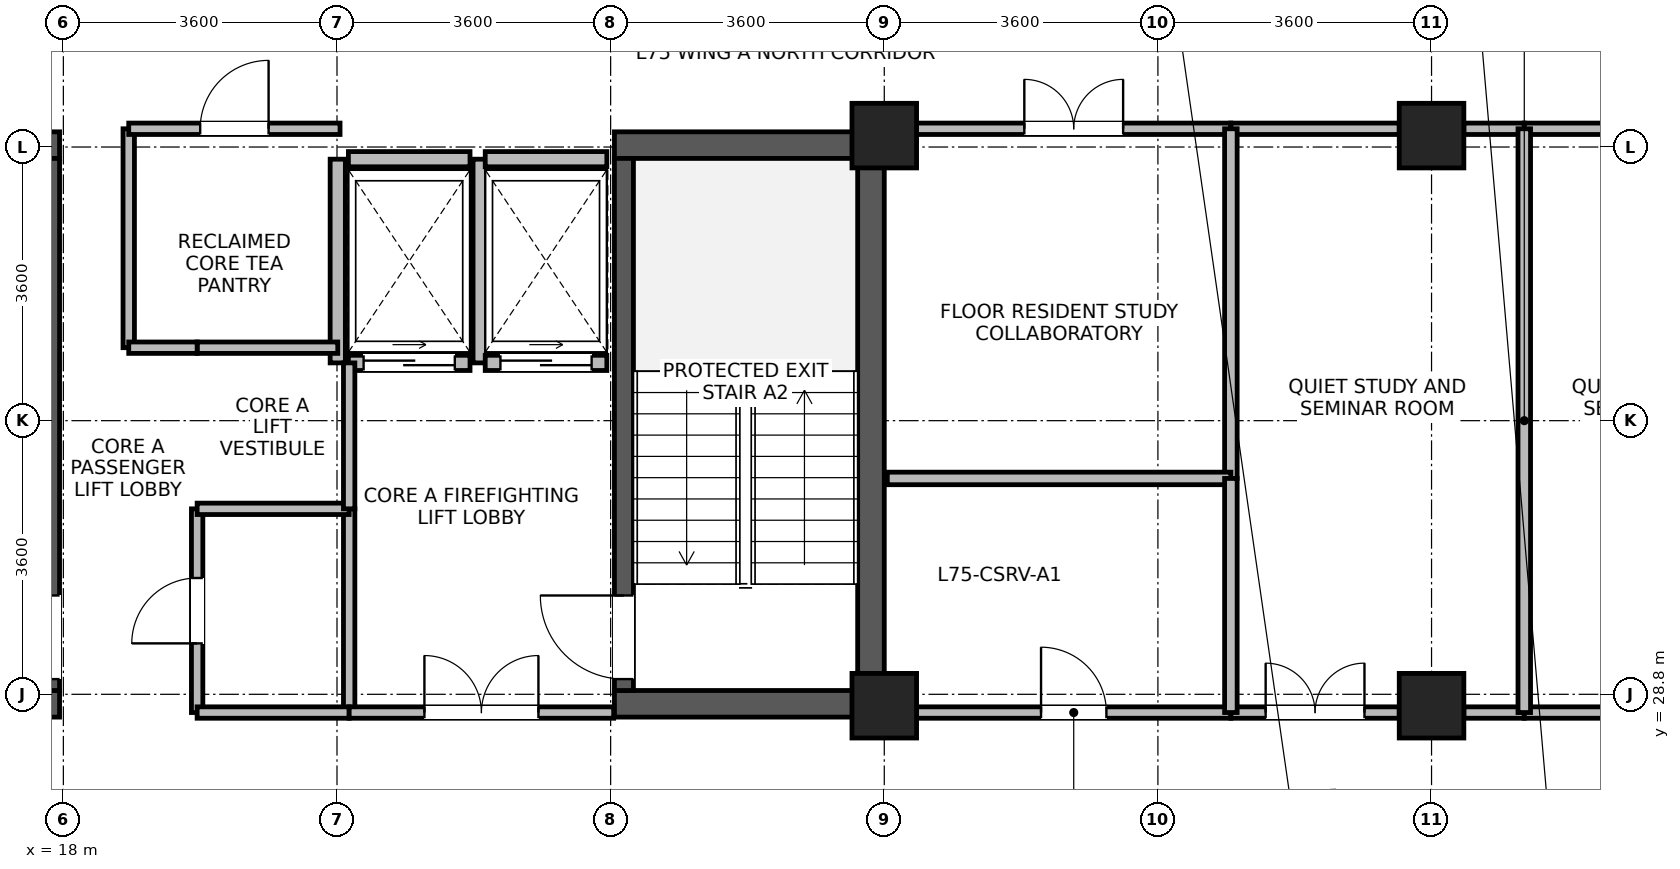
"""IFC4 building model, lengths in metres.
Left out: names, types, materials, properties, quantities, classifications, styles, units other than length and angle.
Written with IfcOpenShell. Run it as: python <this file> out.ifc"""

import sys

from ifc_helpers import new_model, si_unit, direction, frame, frame_2d, origin, origin_2d, place, context, subcontext, project, spatial, rectangle, extrude, source, transform, mapped, element, fill, save


model = new_model("IFC4")
c1 = context("Model", 3, precision=1e-05, world=origin(), true_north=direction((0.0, 1.0)))
c2 = subcontext(c1, "Body", "Model", "MODEL_VIEW")
j1 = project(units=[si_unit("LENGTHUNIT", "METRE"), si_unit("PLANEANGLEUNIT", "RADIAN")], contexts=[c1])
p1 = place(None, origin())
s1 = spatial("IfcSite", under=j1, at=p1, CompositionType="ELEMENT")
p2 = place(p1, origin())
s2 = spatial("IfcBuilding", under=s1, at=p2, CompositionType="ELEMENT")
p3 = place(p2, frame((0.0, 0.0, 290.6)))
s3 = spatial("IfcBuildingStorey", under=s2, at=p3, CompositionType="ELEMENT", Elevation=290.6)
p4 = place(p3, frame((28.625, 28.5, 0.0), z_axis=(0.0, 0.0, 1.0), x_axis=(0.0, 1.0, 0.0)))
e1 = element("IfcWall", 1, at=p4, inside=s3, PredefinedType="SHEAR", context=c2, shape_type="SweptSolid", body=[
    extrude(rectangle(XDim=7.7, YDim=0.35, at=frame_2d((3.85, 0.0))), origin(), (0.0, 0.0, 1.0), 3.475),
])
for number, where, z_axis, x_axis in (
    (2, (14.75, 28.675, 0.0), (0.0, 0.0, 1.0), (1.0, 0.0, 0.0)),
    (3, (25.25, 28.675, 0.0), (0.0, 0.0, 1.0), (1.0, 0.0, 0.0)),
    (4, (14.75, 36.025, 0.0), (0.0, 0.0, 1.0), (1.0, 0.0, 0.0)),
    (5, (25.25, 36.025, 0.0), (0.0, 0.0, 1.0), (1.0, 0.0, 0.0)),
):
    element("IfcWall", number, at=place(p3, frame(where, z_axis=z_axis, x_axis=x_axis)), inside=s3, PredefinedType="SHEAR", context=c2, shape_type="SweptSolid", body=[
        extrude(rectangle(XDim=3.2, YDim=0.35, at=frame_2d((1.6, 0.0))), origin(), (0.0, 0.0, 1.0), 3.475),
    ])
p5 = place(p3, frame((17.825, 28.85, 0.0), z_axis=(0.0, 0.0, 1.0), x_axis=(0.0, 1.0, 0.0)))
e6 = element("IfcWall", 6, at=p5, inside=s3, PredefinedType="SHEAR", context=c2, shape_type="SweptSolid", body=[
    extrude(rectangle(XDim=7.0, YDim=0.25, at=frame_2d((3.5, 0.0))), origin(), (0.0, 0.0, 1.0), 3.475),
])
p6 = place(p5, frame((0.15, 0.0, 0.0)))
e7 = element("IfcOpeningElement", 7, at=p6, cuts=e6, PredefinedType="OPENING", context=c2, shape_type="SweptSolid", body=[
    extrude(rectangle(XDim=1.1, YDim=2.08, at=frame_2d((0.55, 1.04))), frame((0.0, 0.135, 0.0), z_axis=(0.0, -1.0, 0.0), x_axis=(1.0, 0.0, 0.0)), (0.0, 0.0, 1.0), 0.27),
])
p7 = place(p3, frame((25.375, 28.85, 0.0), z_axis=(0.0, 0.0, 1.0), x_axis=(0.0, 1.0, 0.0)))
e8 = element("IfcWall", 8, at=p7, inside=s3, PredefinedType="SHEAR", context=c2, shape_type="SweptSolid", body=[
    extrude(rectangle(XDim=7.0, YDim=0.25, at=frame_2d((3.5, 0.0))), origin(), (0.0, 0.0, 1.0), 3.475),
])
p8 = place(p7, frame((0.15, 0.0, 0.0)))
e9 = element("IfcOpeningElement", 9, at=p8, cuts=e8, PredefinedType="OPENING", context=c2, shape_type="SweptSolid", body=[
    extrude(rectangle(XDim=1.1, YDim=2.08, at=frame_2d((0.55, 1.04))), frame((0.0, 0.135, 0.0), z_axis=(0.0, -1.0, 0.0), x_axis=(1.0, 0.0, 0.0)), (0.0, 0.0, 1.0), 0.27),
])
m1 = source(origin(), c2, "Body", "SweptSolid", [
    extrude(rectangle(XDim=0.85, YDim=0.85, at=origin_2d()), origin(), (0.0, 0.0, 1.0), 3.7),
])
for number, where, z_axis, x_axis in (
    (10, (28.8, 28.65, 0.0), (0.0, 0.0, 1.0), (1.0, 0.0, 0.0)),
    (11, (28.8, 36.15, 0.0), (0.0, 0.0, 1.0), (1.0, 0.0, 0.0)),
    (12, (36.0, 28.65, 0.0), (0.0, 0.0, 1.0), (1.0, 0.0, 0.0)),
    (13, (36.0, 36.15, 0.0), (0.0, 0.0, 1.0), (1.0, 0.0, 0.0)),
):
    element("IfcColumn", number, at=place(p3, frame(where, z_axis=z_axis, x_axis=x_axis)), inside=s3, PredefinedType="COLUMN", context=c2, shape_type="MappedRepresentation", body=[
        mapped(m1, transform((0.0, 0.0, 0.0), x_axis=(1.0, 0.0, 0.0), y_axis=(0.0, 1.0, 0.0), z_axis=(0.0, 0.0, 1.0), scale=1.0)),
    ])
p9 = place(p3, frame((21.75, 33.16, 0.0), z_axis=(0.0, 0.0, 1.0), x_axis=(1.0, 0.0, 0.0)))
e14 = element("IfcWall", 14, at=p9, inside=s3, PredefinedType="PARTITIONING", context=c2, shape_type="SweptSolid", body=[
    extrude(rectangle(XDim=1.6, YDim=0.2, at=frame_2d((0.8, 0.0))), origin(), (0.0, 0.0, 1.0), 3.455),
])
p10 = place(p9, frame((0.2, 0.0, 0.0)))
e15 = element("IfcOpeningElement", 15, at=p10, cuts=e14, PredefinedType="OPENING", context=c2, shape_type="SweptSolid", body=[
    extrude(rectangle(XDim=1.2, YDim=2.12, at=frame_2d((0.6, 1.06))), frame((0.0, 0.11, 0.0), z_axis=(0.0, -1.0, 0.0), x_axis=(1.0, 0.0, 0.0)), (0.0, 0.0, 1.0), 0.22),
])
p11 = place(p3, frame((21.75, 35.84, 0.0), z_axis=(0.0, 0.0, 1.0), x_axis=(1.0, 0.0, 0.0)))
e16 = element("IfcWall", 16, at=p11, inside=s3, PredefinedType="PARTITIONING", context=c2, shape_type="SweptSolid", body=[
    extrude(rectangle(XDim=1.6, YDim=0.2, at=frame_2d((0.8, 0.0))), origin(), (0.0, 0.0, 1.0), 2.555),
])
for number, where, z_axis, x_axis in (
    (17, (21.61, 33.16, 0.0), (0.0, 0.0, 1.0), (0.0, 1.0, 0.0)),
    (18, (23.49, 33.16, 0.0), (0.0, 0.0, 1.0), (0.0, 1.0, 0.0)),
):
    element("IfcWall", number, at=place(p3, frame(where, z_axis=z_axis, x_axis=x_axis)), inside=s3, PredefinedType="PARTITIONING", context=c2, shape_type="SweptSolid", body=[
        extrude(rectangle(XDim=2.68, YDim=0.2, at=frame_2d((1.34, 0.0))), origin(), (0.0, 0.0, 1.0), 3.455),
    ])
p12 = place(p3, frame((23.55, 33.16, 0.0), z_axis=(0.0, 0.0, 1.0), x_axis=(1.0, 0.0, 0.0)))
e19 = element("IfcWall", 19, at=p12, inside=s3, PredefinedType="PARTITIONING", context=c2, shape_type="SweptSolid", body=[
    extrude(rectangle(XDim=1.6, YDim=0.2, at=frame_2d((0.8, 0.0))), origin(), (0.0, 0.0, 1.0), 3.455),
])
p13 = place(p12, frame((0.2, 0.0, 0.0)))
e20 = element("IfcOpeningElement", 20, at=p13, cuts=e19, PredefinedType="OPENING", context=c2, shape_type="SweptSolid", body=[
    extrude(rectangle(XDim=1.2, YDim=2.12, at=frame_2d((0.6, 1.06))), frame((0.0, 0.11, 0.0), z_axis=(0.0, -1.0, 0.0), x_axis=(1.0, 0.0, 0.0)), (0.0, 0.0, 1.0), 0.22),
])
p14 = place(p3, frame((23.55, 35.84, 0.0), z_axis=(0.0, 0.0, 1.0), x_axis=(1.0, 0.0, 0.0)))
e21 = element("IfcWall", 21, at=p14, inside=s3, PredefinedType="PARTITIONING", context=c2, shape_type="SweptSolid", body=[
    extrude(rectangle(XDim=1.6, YDim=0.2, at=frame_2d((0.8, 0.0))), origin(), (0.0, 0.0, 1.0), 2.555),
])
p15 = place(p3, frame((29.225, 28.56, 0.0), z_axis=(0.0, 0.0, 1.0), x_axis=(1.0, 0.0, 0.0)))
e22 = element("IfcWall", 22, at=p15, inside=s3, PredefinedType="PARTITIONING", context=c2, shape_type="SweptSolid", body=[
    extrude(rectangle(XDim=4.135, YDim=0.15, at=frame_2d((2.067, 0.0))), origin(), (0.0, 0.0, 1.0), 2.905),
])
p16 = place(p15, frame((1.637, 0.0, 0.0)))
e23 = element("IfcOpeningElement", 23, at=p16, cuts=e22, PredefinedType="OPENING", context=c2, shape_type="SweptSolid", body=[
    extrude(rectangle(XDim=0.86, YDim=2.02, at=frame_2d((0.43, 1.01))), frame((0.0, 0.085, 0.0), z_axis=(0.0, -1.0, 0.0), x_axis=(1.0, 0.0, 0.0)), (0.0, 0.0, 1.0), 0.17),
])
p17 = place(p3, frame((29.225, 36.24, 0.0), z_axis=(0.0, 0.0, 1.0), x_axis=(1.0, 0.0, 0.0)))
e24 = element("IfcWall", 24, at=p17, inside=s3, PredefinedType="PARTITIONING", context=c2, shape_type="SweptSolid", body=[
    extrude(rectangle(XDim=4.135, YDim=0.15, at=frame_2d((2.067, 0.0))), origin(), (0.0, 0.0, 1.0), 2.905),
])
p18 = place(p17, frame((1.417, 0.0, 0.0)))
e25 = element("IfcOpeningElement", 25, at=p18, cuts=e24, PredefinedType="OPENING", context=c2, shape_type="SweptSolid", body=[
    extrude(rectangle(XDim=1.3, YDim=2.12, at=frame_2d((0.65, 1.06))), frame((0.0, 0.085, 0.0), z_axis=(0.0, -1.0, 0.0), x_axis=(1.0, 0.0, 0.0)), (0.0, 0.0, 1.0), 0.17),
])
p19 = place(p3, frame((33.36, 28.56, 0.0), z_axis=(0.0, 0.0, 1.0), x_axis=(1.0, 0.0, 0.0)))
e26 = element("IfcWall", 26, at=p19, inside=s3, PredefinedType="PARTITIONING", context=c2, shape_type="SweptSolid", body=[
    extrude(rectangle(XDim=2.215, YDim=0.15, at=frame_2d((1.107, 0.0))), origin(), (0.0, 0.0, 1.0), 2.905),
])
p20 = place(p19, frame((0.458, 0.0, 0.0)))
e27 = element("IfcOpeningElement", 27, at=p20, cuts=e26, PredefinedType="OPENING", context=c2, shape_type="SweptSolid", body=[
    extrude(rectangle(XDim=1.3, YDim=2.12, at=frame_2d((0.65, 1.06))), frame((0.0, 0.085, 0.0), z_axis=(0.0, -1.0, 0.0), x_axis=(1.0, 0.0, 0.0)), (0.0, 0.0, 1.0), 0.17),
])
p21 = place(p3, frame((36.425, 28.56, 0.0), z_axis=(0.0, 0.0, 1.0), x_axis=(1.0, 0.0, 0.0)))
e28 = element("IfcWall", 28, at=p21, inside=s3, PredefinedType="PARTITIONING", context=c2, shape_type="SweptSolid", body=[
    extrude(rectangle(XDim=0.795, YDim=0.15, at=frame_2d((0.397, 0.0))), origin(), (0.0, 0.0, 1.0), 2.905),
])
p22 = place(p3, frame((33.36, 36.24, 0.0), z_axis=(0.0, 0.0, 1.0), x_axis=(1.0, 0.0, 0.0)))
e29 = element("IfcWall", 29, at=p22, inside=s3, PredefinedType="PARTITIONING", context=c2, shape_type="SweptSolid", body=[
    extrude(rectangle(XDim=2.215, YDim=0.15, at=frame_2d((1.107, 0.0))), origin(), (0.0, 0.0, 1.0), 2.905),
])
p23 = place(p3, frame((36.425, 36.24, 0.0), z_axis=(0.0, 0.0, 1.0), x_axis=(1.0, 0.0, 0.0)))
e30 = element("IfcWall", 30, at=p23, inside=s3, PredefinedType="PARTITIONING", context=c2, shape_type="SweptSolid", body=[
    extrude(rectangle(XDim=0.795, YDim=0.15, at=frame_2d((0.397, 0.0))), origin(), (0.0, 0.0, 1.0), 2.905),
])
p24 = place(p3, frame((37.22, 28.56, 0.0), z_axis=(0.0, 0.0, 1.0), x_axis=(1.0, 0.0, 0.0)))
e31 = element("IfcWall", 31, at=p24, inside=s3, PredefinedType="PARTITIONING", context=c2, shape_type="SweptSolid", body=[
    extrude(rectangle(XDim=3.58, YDim=0.15, at=frame_2d((1.79, 0.0))), origin(), (0.0, 0.0, 1.0), 2.905),
])
p25 = place(p24, frame((1.14, 0.0, 0.0)))
e32 = element("IfcOpeningElement", 32, at=p25, cuts=e31, PredefinedType="OPENING", context=c2, shape_type="SweptSolid", body=[
    extrude(rectangle(XDim=1.3, YDim=2.12, at=frame_2d((0.65, 1.06))), frame((0.0, 0.085, 0.0), z_axis=(0.0, -1.0, 0.0), x_axis=(1.0, 0.0, 0.0)), (0.0, 0.0, 1.0), 0.17),
])
p26 = place(p3, frame((37.22, 36.24, 0.0), z_axis=(0.0, 0.0, 1.0), x_axis=(1.0, 0.0, 0.0)))
e33 = element("IfcWall", 33, at=p26, inside=s3, PredefinedType="PARTITIONING", context=c2, shape_type="SweptSolid", body=[
    extrude(rectangle(XDim=3.58, YDim=0.15, at=frame_2d((1.79, 0.0))), origin(), (0.0, 0.0, 1.0), 2.905),
])
p27 = place(p3, frame((18.86, 33.36, 0.0), z_axis=(0.0, 0.0, 1.0), x_axis=(0.0, 1.0, 0.0)))
e34 = element("IfcWall", 34, at=p27, inside=s3, PredefinedType="PARTITIONING", context=c2, shape_type="SweptSolid", body=[
    extrude(rectangle(XDim=2.88, YDim=0.15, at=frame_2d((1.44, 0.0))), origin(), (0.0, 0.0, 1.0), 3.455),
])
p28 = place(p3, frame((18.86, 36.24, 0.0), z_axis=(0.0, 0.0, 1.0), x_axis=(1.0, 0.0, 0.0)))
e35 = element("IfcWall", 35, at=p28, inside=s3, PredefinedType="PARTITIONING", context=c2, shape_type="SweptSolid", body=[
    extrude(rectangle(XDim=2.78, YDim=0.15, at=frame_2d((1.39, 0.0))), origin(), (0.0, 0.0, 1.0), 2.555),
])
p29 = place(p28, frame((0.94, 0.0, 0.0)))
e36 = element("IfcOpeningElement", 36, at=p29, cuts=e35, PredefinedType="OPENING", context=c2, shape_type="SweptSolid", body=[
    extrude(rectangle(XDim=0.9, YDim=2.08, at=frame_2d((0.45, 1.04))), frame((0.0, 0.085, 0.0), z_axis=(0.0, -1.0, 0.0), x_axis=(1.0, 0.0, 0.0)), (0.0, 0.0, 1.0), 0.17),
])
p30 = place(p3, frame((19.76, 28.56, 0.0), z_axis=(0.0, 0.0, 1.0), x_axis=(0.0, 1.0, 0.0)))
e37 = element("IfcWall", 37, at=p30, inside=s3, PredefinedType="PARTITIONING", context=c2, shape_type="SweptSolid", body=[
    extrude(rectangle(XDim=2.68, YDim=0.15, at=frame_2d((1.34, 0.0))), origin(), (0.0, 0.0, 1.0), 3.455),
])
p31 = place(p30, frame((0.91, 0.0, 0.0)))
e38 = element("IfcOpeningElement", 38, at=p31, cuts=e37, PredefinedType="OPENING", context=c2, shape_type="SweptSolid", body=[
    extrude(rectangle(XDim=0.86, YDim=2.02, at=frame_2d((0.43, 1.01))), frame((0.0, 0.085, 0.0), z_axis=(0.0, -1.0, 0.0), x_axis=(1.0, 0.0, 0.0)), (0.0, 0.0, 1.0), 0.17),
])
p32 = place(p3, frame((21.76, 28.56, 0.0), z_axis=(0.0, 0.0, 1.0), x_axis=(0.0, 1.0, 0.0)))
e39 = element("IfcWall", 39, at=p32, inside=s3, PredefinedType="PARTITIONING", context=c2, shape_type="SweptSolid", body=[
    extrude(rectangle(XDim=2.68, YDim=0.15, at=frame_2d((1.34, 0.0))), origin(), (0.0, 0.0, 1.0), 3.455),
])
p33 = place(p3, frame((19.76, 28.56, 0.0), z_axis=(0.0, 0.0, 1.0), x_axis=(1.0, 0.0, 0.0)))
e40 = element("IfcWall", 40, at=p33, inside=s3, PredefinedType="PARTITIONING", context=c2, shape_type="SweptSolid", body=[
    extrude(rectangle(XDim=2.0, YDim=0.15, at=frame_2d((1.0, 0.0))), origin(), (0.0, 0.0, 1.0), 2.555),
])
p34 = place(p3, frame((19.76, 31.24, 0.0), z_axis=(0.0, 0.0, 1.0), x_axis=(1.0, 0.0, 0.0)))
e41 = element("IfcWall", 41, at=p34, inside=s3, PredefinedType="PARTITIONING", context=c2, shape_type="SweptSolid", body=[
    extrude(rectangle(XDim=2.0, YDim=0.15, at=frame_2d((1.0, 0.0))), origin(), (0.0, 0.0, 1.0), 3.455),
])
p35 = place(p3, frame((19.76, 33.36, 0.0), z_axis=(0.0, 0.0, 1.0), x_axis=(1.0, 0.0, 0.0)))
e42 = element("IfcWall", 42, at=p35, inside=s3, PredefinedType="PARTITIONING", context=c2, shape_type="SweptSolid", body=[
    extrude(rectangle(XDim=1.85, YDim=0.15, at=frame_2d((0.925, 0.0))), origin(), (0.0, 0.0, 1.0), 3.455),
])
p36 = place(p3, frame((18.86, 33.36, 0.0), z_axis=(0.0, 0.0, 1.0), x_axis=(1.0, 0.0, 0.0)))
e43 = element("IfcWall", 43, at=p36, inside=s3, PredefinedType="PARTITIONING", context=c2, shape_type="SweptSolid", body=[
    extrude(rectangle(XDim=0.9, YDim=0.15, at=frame_2d((0.45, 0.0))), origin(), (0.0, 0.0, 1.0), 3.455),
])
p37 = place(p3, frame((37.22, 28.56, 0.0), z_axis=(0.0, 0.0, 1.0), x_axis=(0.0, 1.0, 0.0)))
e44 = element("IfcWall", 44, at=p37, inside=s3, PredefinedType="PARTITIONING", context=c2, shape_type="SweptSolid", body=[
    extrude(rectangle(XDim=7.68, YDim=0.165, at=frame_2d((3.84, 0.0))), origin(), (0.0, 0.0, 1.0), 3.455),
])
p38 = place(p3, frame((33.36, 31.64, 0.0), z_axis=(0.0, 0.0, 1.0), x_axis=(0.0, 1.0, 0.0)))
e45 = element("IfcWall", 45, at=p38, inside=s3, PredefinedType="PARTITIONING", context=c2, shape_type="SweptSolid", body=[
    extrude(rectangle(XDim=4.6, YDim=0.165, at=frame_2d((2.3, 0.0))), origin(), (0.0, 0.0, 1.0), 3.455),
])
p39 = place(p3, frame((28.84, 31.64, 0.0), z_axis=(0.0, 0.0, 1.0), x_axis=(1.0, 0.0, 0.0)))
e46 = element("IfcWall", 46, at=p39, inside=s3, PredefinedType="PARTITIONING", context=c2, shape_type="SweptSolid", body=[
    extrude(rectangle(XDim=4.52, YDim=0.165, at=frame_2d((2.26, 0.0))), origin(), (0.0, 0.0, 1.0), 3.455),
])
p40 = place(p3, frame((21.76, 28.56, 0.0), z_axis=(0.0, 0.0, 1.0), x_axis=(1.0, 0.0, 0.0)))
e47 = element("IfcWall", 47, at=p40, inside=s3, PredefinedType="PARTITIONING", context=c2, shape_type="SweptSolid", body=[
    extrude(rectangle(XDim=3.48, YDim=0.15, at=frame_2d((1.74, 0.0))), origin(), (0.0, 0.0, 1.0), 2.555),
])
p41 = place(p40, frame((0.99, 0.0, 0.0)))
e48 = element("IfcOpeningElement", 48, at=p41, cuts=e47, PredefinedType="OPENING", context=c2, shape_type="SweptSolid", body=[
    extrude(rectangle(XDim=1.5, YDim=2.1, at=frame_2d((0.75, 1.05))), frame((0.0, 0.085, 0.0), z_axis=(0.0, -1.0, 0.0), x_axis=(1.0, 0.0, 0.0)), (0.0, 0.0, 1.0), 0.17),
])
p42 = place(p3, frame((33.36, 28.56, 0.0), z_axis=(0.0, 0.0, 1.0), x_axis=(0.0, 1.0, 0.0)))
e49 = element("IfcWall", 49, at=p42, inside=s3, PredefinedType="PARTITIONING", context=c2, shape_type="SweptSolid", body=[
    extrude(rectangle(XDim=3.08, YDim=0.165, at=frame_2d((1.54, 0.0))), origin(), (0.0, 0.0, 1.0), 3.455),
])
p43 = place(p3, frame((21.76, 31.24, 0.0), z_axis=(0.0, 0.0, 1.0), x_axis=(0.0, 1.0, 0.0)))
e50 = element("IfcWall", 50, at=p43, inside=s3, PredefinedType="PARTITIONING", context=c2, shape_type="SweptSolid", body=[
    extrude(rectangle(XDim=1.92, YDim=0.15, at=frame_2d((0.96, 0.0))), origin(), (0.0, 0.0, 1.0), 3.455),
])
p44 = place(p8, origin())
e51 = element("IfcDoor", 51, at=p44, inside=s3, OperationType="SINGLE_SWING_RIGHT", PredefinedType="DOOR", context=c2, shape_type="SweptSolid", body=[
    extrude(rectangle(XDim=1.1, YDim=2.08, at=frame_2d((0.55, 1.04))), frame((0.0, 0.025, 0.0), z_axis=(0.0, -1.0, 0.0), x_axis=(1.0, 0.0, 0.0)), (0.0, 0.0, 1.0), 0.05),
])
fill(e9, e51)
p45 = place(p10, origin())
e52 = element("IfcDoor", 52, at=p45, inside=s3, OperationType="SLIDING_TO_RIGHT", PredefinedType="DOOR", context=c2, shape_type="SweptSolid", body=[
    extrude(rectangle(XDim=1.2, YDim=2.12, at=frame_2d((0.6, 1.06))), frame((0.0, 0.025, 0.0), z_axis=(0.0, -1.0, 0.0), x_axis=(1.0, 0.0, 0.0)), (0.0, 0.0, 1.0), 0.05),
])
fill(e15, e52)
p46 = place(p13, origin())
e53 = element("IfcDoor", 53, at=p46, inside=s3, OperationType="SLIDING_TO_RIGHT", PredefinedType="DOOR", context=c2, shape_type="SweptSolid", body=[
    extrude(rectangle(XDim=1.2, YDim=2.12, at=frame_2d((0.6, 1.06))), frame((0.0, 0.025, 0.0), z_axis=(0.0, -1.0, 0.0), x_axis=(1.0, 0.0, 0.0)), (0.0, 0.0, 1.0), 0.05),
])
fill(e20, e53)
p47 = place(p16, origin())
e54 = element("IfcDoor", 54, at=p47, inside=s3, OperationType="SINGLE_SWING_LEFT", PredefinedType="DOOR", context=c2, shape_type="SweptSolid", body=[
    extrude(rectangle(XDim=0.86, YDim=2.02, at=frame_2d((0.43, 1.01))), frame((0.0, 0.025, 0.0), z_axis=(0.0, -1.0, 0.0), x_axis=(1.0, 0.0, 0.0)), (0.0, 0.0, 1.0), 0.05),
])
fill(e23, e54)
p48 = place(p18, origin())
e55 = element("IfcDoor", 55, at=p48, inside=s3, OperationType="DOUBLE_DOOR_SINGLE_SWING", PredefinedType="DOOR", context=c2, shape_type="SweptSolid", body=[
    extrude(rectangle(XDim=1.3, YDim=2.12, at=frame_2d((0.65, 1.06))), frame((0.0, 0.025, 0.0), z_axis=(0.0, -1.0, 0.0), x_axis=(1.0, 0.0, 0.0)), (0.0, 0.0, 1.0), 0.05),
])
fill(e25, e55)
p49 = place(p20, origin())
e56 = element("IfcDoor", 56, at=p49, inside=s3, OperationType="DOUBLE_DOOR_SINGLE_SWING", PredefinedType="DOOR", context=c2, shape_type="SweptSolid", body=[
    extrude(rectangle(XDim=1.3, YDim=2.12, at=frame_2d((0.65, 1.06))), frame((0.0, 0.025, 0.0), z_axis=(0.0, -1.0, 0.0), x_axis=(1.0, 0.0, 0.0)), (0.0, 0.0, 1.0), 0.05),
])
fill(e27, e56)
p50 = place(p29, origin())
e57 = element("IfcDoor", 57, at=p50, inside=s3, OperationType="SINGLE_SWING_RIGHT", PredefinedType="DOOR", context=c2, shape_type="SweptSolid", body=[
    extrude(rectangle(XDim=0.9, YDim=2.08, at=frame_2d((0.45, 1.04))), frame((0.0, 0.025, 0.0), z_axis=(0.0, -1.0, 0.0), x_axis=(1.0, 0.0, 0.0)), (0.0, 0.0, 1.0), 0.05),
])
fill(e36, e57)
p51 = place(p31, origin())
e58 = element("IfcDoor", 58, at=p51, inside=s3, OperationType="SINGLE_SWING_LEFT", PredefinedType="DOOR", context=c2, shape_type="SweptSolid", body=[
    extrude(rectangle(XDim=0.86, YDim=2.02, at=frame_2d((0.43, 1.01))), frame((0.0, 0.025, 0.0), z_axis=(0.0, -1.0, 0.0), x_axis=(1.0, 0.0, 0.0)), (0.0, 0.0, 1.0), 0.05),
])
fill(e38, e58)
p52 = place(p41, origin())
e59 = element("IfcDoor", 59, at=p52, inside=s3, OperationType="DOUBLE_DOOR_SINGLE_SWING", PredefinedType="DOOR", context=c2, shape_type="SweptSolid", body=[
    extrude(rectangle(XDim=1.5, YDim=2.1, at=frame_2d((0.75, 1.05))), frame((0.0, 0.025, 0.0), z_axis=(0.0, -1.0, 0.0), x_axis=(1.0, 0.0, 0.0)), (0.0, 0.0, 1.0), 0.05),
])
fill(e48, e59)
save(model, sys.argv[1])
